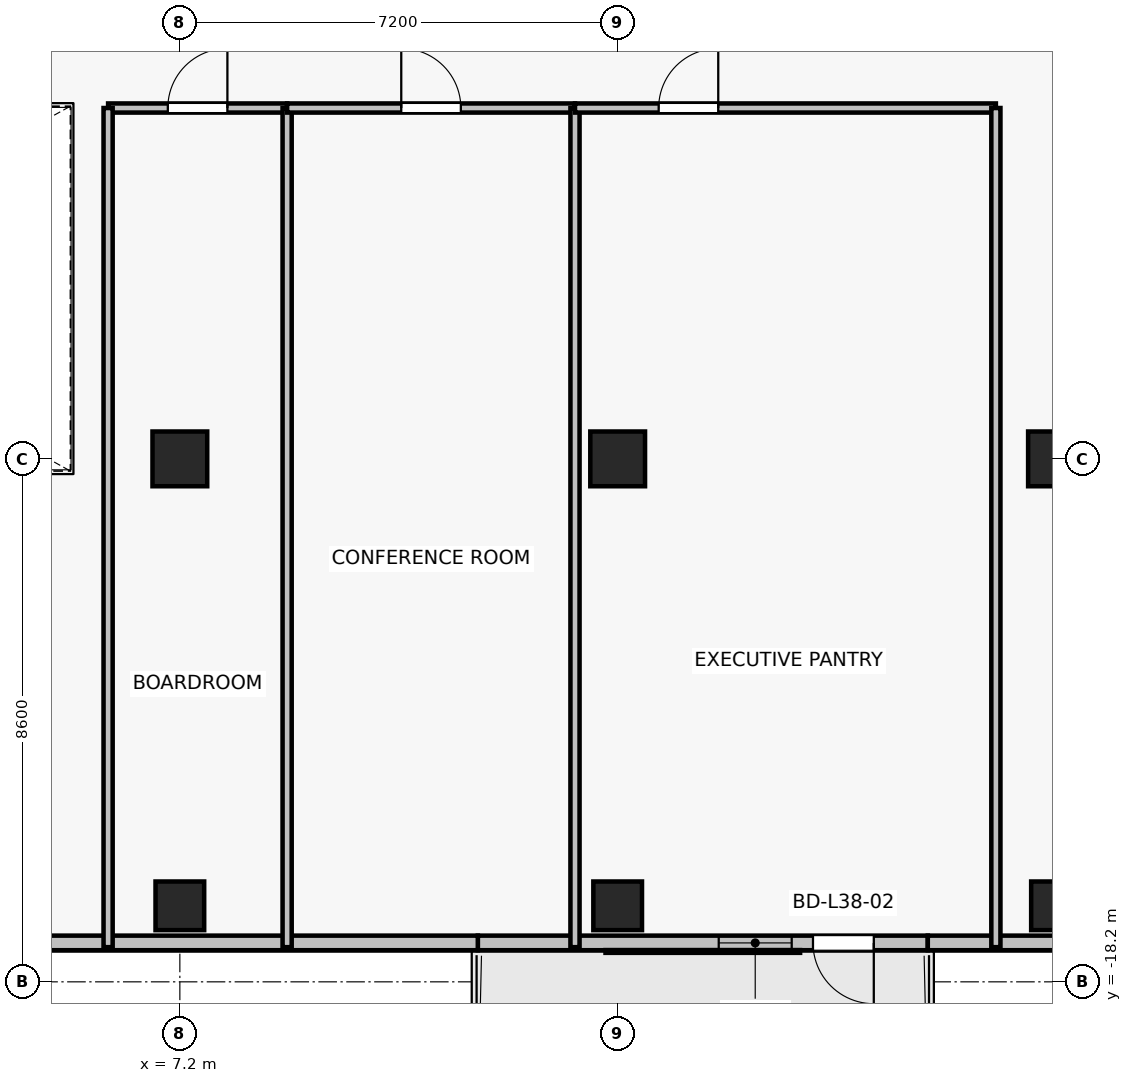
"""IFC4 building model, lengths in metres.
Left out: names, types, materials, properties, quantities, classifications, styles, units other than length and angle.
Written with IfcOpenShell. Run it as: python <this file> out.ifc"""

import sys

from ifc_helpers import new_model, si_unit, direction, frame, frame_2d, origin, origin_2d, place, context, subcontext, project, spatial, rectangle, extrude, source, transform, mapped, element, fill, save


model = new_model("IFC4")
c1 = context("Model", 3, precision=1e-05, world=origin(), true_north=direction((0.0, 1.0)))
c2 = subcontext(c1, "Body", "Model", "MODEL_VIEW")
j1 = project(units=[si_unit("LENGTHUNIT", "METRE"), si_unit("PLANEANGLEUNIT", "RADIAN")], contexts=[c1])
p1 = place(None, origin())
s1 = spatial("IfcSite", under=j1, at=p1, CompositionType="ELEMENT")
p2 = place(p1, origin())
s2 = spatial("IfcBuilding", under=s1, at=p2, CompositionType="ELEMENT")
p3 = place(p2, frame((0.0, 0.0, 136.3)))
s3 = spatial("IfcBuildingStorey", under=s2, at=p3, CompositionType="ELEMENT", Elevation=136.3)
for number, where, z_axis, x_axis in (
    (1, (7.2, -9.6, 0.0), (0.0, 0.0, 1.0), (1.0, 0.0, 0.0)),
    (2, (14.4, -9.6, 0.0), (0.0, 0.0, 1.0), (1.0, 0.0, 0.0)),
    (3, (21.6, -9.6, 0.0), (0.0, 0.0, 1.0), (1.0, 0.0, 0.0)),
):
    element("IfcColumn", number, at=place(p3, frame(where, z_axis=z_axis, x_axis=x_axis)), inside=s3, PredefinedType="COLUMN", context=c2, shape_type="SweptSolid", body=[
        extrude(rectangle(XDim=0.9, YDim=0.9, at=origin_2d()), origin(), (0.0, 0.0, 1.0), 3.3),
    ])
for number, where, z_axis, x_axis in (
    (4, (7.2, -16.95, 0.0), (0.0, 0.0, 1.0), (1.0, 0.0, 0.0)),
    (5, (14.4, -16.95, 0.0), (0.0, 0.0, 1.0), (1.0, 0.0, 0.0)),
    (6, (21.6, -16.95, 0.0), (0.0, 0.0, 1.0), (1.0, 0.0, 0.0)),
):
    element("IfcColumn", number, at=place(p3, frame(where, z_axis=z_axis, x_axis=x_axis)), inside=s3, PredefinedType="COLUMN", context=c2, shape_type="SweptSolid", body=[
        extrude(rectangle(XDim=0.8, YDim=0.8, at=origin_2d()), origin(), (0.0, 0.0, 1.0), 3.3),
    ])
p4 = place(p3, frame((19.5, -17.56, 0.0), z_axis=(0.0, 0.0, 1.0), x_axis=(-1.0, 0.0, 0.0)))
e7 = element("IfcWall", 7, at=p4, inside=s3, PredefinedType="SOLIDWALL", context=c2, shape_type="SweptSolid", body=[
    extrude(rectangle(XDim=7.4, YDim=0.24, at=frame_2d((3.7, 0.0))), origin(), (0.0, 0.0, 1.0), 3.05),
])
p5 = place(p4, frame((0.888, 0.0, 0.0)))
e8 = element("IfcOpeningElement", 8, at=p5, cuts=e7, PredefinedType="OPENING", context=c2, shape_type="SweptSolid", body=[
    extrude(rectangle(XDim=1.0, YDim=2.2, at=frame_2d((0.5, 1.1))), frame((0.0, 0.13, 0.0), z_axis=(0.0, -1.0, 0.0), x_axis=(1.0, 0.0, 0.0)), (0.0, 0.0, 1.0), 0.26),
])
p6 = place(p4, frame((2.238, 0.0, 0.85)))
e9 = element("IfcOpeningElement", 9, at=p6, cuts=e7, PredefinedType="OPENING", context=c2, shape_type="SweptSolid", body=[
    extrude(rectangle(XDim=1.2, YDim=1.5, at=frame_2d((0.6, 0.75))), frame((0.0, 0.13, 0.0), z_axis=(0.0, -1.0, 0.0), x_axis=(1.0, 0.0, 0.0)), (0.0, 0.0, 1.0), 0.26),
])
p7 = place(p3, frame((19.5, -17.56, 0.0), z_axis=(0.0, 0.0, 1.0), x_axis=(1.0, 0.0, 0.0)))
e10 = element("IfcWall", 10, at=p7, inside=s3, PredefinedType="SOLIDWALL", context=c2, shape_type="SweptSolid", body=[
    extrude(rectangle(XDim=6.96, YDim=0.24, at=frame_2d((3.48, 0.0))), origin(), (0.0, 0.0, 1.0), 3.05),
])
p8 = place(p3, frame((3.34, -17.56, 0.0), z_axis=(0.0, 0.0, 1.0), x_axis=(1.0, 0.0, 0.0)))
e11 = element("IfcWall", 11, at=p8, inside=s3, PredefinedType="SOLIDWALL", context=c2, shape_type="SweptSolid", body=[
    extrude(rectangle(XDim=8.76, YDim=0.24, at=frame_2d((4.38, 0.0))), origin(), (0.0, 0.0, 1.0), 3.05),
])
p9 = place(p3, frame((6.02, -3.83, 0.0), z_axis=(0.0, 0.0, 1.0), x_axis=(1.0, 0.0, 0.0)))
e12 = element("IfcWall", 12, at=p9, inside=s3, PredefinedType="PARTITIONING", context=c2, shape_type="SweptSolid", body=[
    extrude(rectangle(XDim=2.944, YDim=0.15, at=frame_2d((1.472, 0.0))), origin(), (0.0, 0.0, 1.0), 2.49),
])
p10 = place(p9, frame((0.982, 0.0, 0.0)))
e13 = element("IfcOpeningElement", 13, at=p10, cuts=e12, PredefinedType="OPENING", context=c2, shape_type="SweptSolid", body=[
    extrude(rectangle(XDim=0.98, YDim=2.15, at=frame_2d((0.49, 1.075))), frame((0.0, 0.085, 0.0), z_axis=(0.0, -1.0, 0.0), x_axis=(1.0, 0.0, 0.0)), (0.0, 0.0, 1.0), 0.17),
])
for number, where, z_axis, x_axis in (
    (14, (6.02, -17.63, 0.0), (0.0, 0.0, 1.0), (0.0, 1.0, 0.0)),
    (15, (8.964, -3.83, 0.0), (0.0, 0.0, 1.0), (0.0, -1.0, 0.0)),
):
    element("IfcWall", number, at=place(p3, frame(where, z_axis=z_axis, x_axis=x_axis)), inside=s3, PredefinedType="PARTITIONING", context=c2, shape_type="SweptSolid", body=[
        extrude(rectangle(XDim=13.8, YDim=0.15, at=frame_2d((6.9, 0.0))), origin(), (0.0, 0.0, 1.0), 2.49),
    ])
p11 = place(p3, frame((8.964, -3.83, 0.0), z_axis=(0.0, 0.0, 1.0), x_axis=(1.0, 0.0, 0.0)))
e16 = element("IfcWall", 16, at=p11, inside=s3, PredefinedType="PARTITIONING", context=c2, shape_type="SweptSolid", body=[
    extrude(rectangle(XDim=4.734, YDim=0.15, at=frame_2d((2.367, 0.0))), origin(), (0.0, 0.0, 1.0), 3.05),
])
p12 = place(p11, frame((1.877, 0.0, 0.0)))
e17 = element("IfcOpeningElement", 17, at=p12, cuts=e16, PredefinedType="OPENING", context=c2, shape_type="SweptSolid", body=[
    extrude(rectangle(XDim=0.98, YDim=2.15, at=frame_2d((0.49, 1.075))), frame((0.0, 0.085, 0.0), z_axis=(0.0, -1.0, 0.0), x_axis=(1.0, 0.0, 0.0)), (0.0, 0.0, 1.0), 0.17),
])
p13 = place(p3, frame((13.698, -3.83, 0.0), z_axis=(0.0, 0.0, 1.0), x_axis=(0.0, -1.0, 0.0)))
e18 = element("IfcWall", 18, at=p13, inside=s3, PredefinedType="PARTITIONING", context=c2, shape_type="SweptSolid", body=[
    extrude(rectangle(XDim=13.8, YDim=0.15, at=frame_2d((6.9, 0.0))), origin(), (0.0, 0.0, 1.0), 2.49),
])
p14 = place(p3, frame((13.698, -3.83, 0.0), z_axis=(0.0, 0.0, 1.0), x_axis=(1.0, 0.0, 0.0)))
e19 = element("IfcWall", 19, at=p14, inside=s3, PredefinedType="PARTITIONING", context=c2, shape_type="SweptSolid", body=[
    extrude(rectangle(XDim=6.922, YDim=0.15, at=frame_2d((3.461, 0.0))), origin(), (0.0, 0.0, 1.0), 2.49),
])
p15 = place(p14, frame((1.376, 0.0, 0.0)))
e20 = element("IfcOpeningElement", 20, at=p15, cuts=e19, PredefinedType="OPENING", context=c2, shape_type="SweptSolid", body=[
    extrude(rectangle(XDim=0.98, YDim=2.15, at=frame_2d((0.49, 1.075))), frame((0.0, 0.085, 0.0), z_axis=(0.0, -1.0, 0.0), x_axis=(1.0, 0.0, 0.0)), (0.0, 0.0, 1.0), 0.17),
])
p16 = place(p3, frame((20.62, -3.83, 0.0), z_axis=(0.0, 0.0, 1.0), x_axis=(0.0, -1.0, 0.0)))
e21 = element("IfcWall", 21, at=p16, inside=s3, PredefinedType="PARTITIONING", context=c2, shape_type="SweptSolid", body=[
    extrude(rectangle(XDim=13.8, YDim=0.15, at=frame_2d((6.9, 0.0))), origin(), (0.0, 0.0, 1.0), 2.49),
])
m1 = source(origin(), c2, "Body", "SweptSolid", [
    extrude(rectangle(XDim=1.0, YDim=2.2, at=frame_2d((0.5, 1.1))), frame((0.0, 0.025, 0.0), z_axis=(0.0, -1.0, 0.0), x_axis=(1.0, 0.0, 0.0)), (0.0, 0.0, 1.0), 0.05),
])
p17 = place(p5, origin())
e22 = element("IfcDoor", 22, at=p17, inside=s3, OperationType="SINGLE_SWING_LEFT", PredefinedType="DOOR", context=c2, shape_type="MappedRepresentation", body=[
    mapped(m1, transform((0.0, 0.0, 0.0), x_axis=(1.0, 0.0, 0.0), y_axis=(0.0, 1.0, 0.0), z_axis=(0.0, 0.0, 1.0), scale=1.0)),
])
fill(e8, e22)
m2 = source(origin(), c2, "Body", "SweptSolid", [
    extrude(rectangle(XDim=1.2, YDim=1.5, at=frame_2d((0.6, 0.75))), frame((0.0, 0.03, 0.0), z_axis=(0.0, -1.0, 0.0), x_axis=(1.0, 0.0, 0.0)), (0.0, 0.0, 1.0), 0.06),
])
p18 = place(p6, origin())
e23 = element("IfcWindow", 23, at=p18, inside=s3, PartitioningType="SINGLE_PANEL", PredefinedType="WINDOW", context=c2, shape_type="MappedRepresentation", body=[
    mapped(m2, transform((0.0, 0.0, 0.0), x_axis=(1.0, 0.0, 0.0), y_axis=(0.0, 1.0, 0.0), z_axis=(0.0, 0.0, 1.0), scale=1.0)),
])
fill(e9, e23)
m3 = source(origin(), c2, "Body", "SweptSolid", [
    extrude(rectangle(XDim=0.98, YDim=2.15, at=frame_2d((0.49, 1.075))), frame((0.0, 0.025, 0.0), z_axis=(0.0, -1.0, 0.0), x_axis=(1.0, 0.0, 0.0)), (0.0, 0.0, 1.0), 0.05),
])
p19 = place(p10, origin())
e24 = element("IfcDoor", 24, at=p19, inside=s3, OperationType="SINGLE_SWING_RIGHT", PredefinedType="DOOR", context=c2, shape_type="MappedRepresentation", body=[
    mapped(m3, transform((0.0, 0.0, 0.0), x_axis=(1.0, 0.0, 0.0), y_axis=(0.0, 1.0, 0.0), z_axis=(0.0, 0.0, 1.0), scale=1.0)),
])
fill(e13, e24)
p20 = place(p12, origin())
e25 = element("IfcDoor", 25, at=p20, inside=s3, OperationType="SINGLE_SWING_LEFT", PredefinedType="DOOR", context=c2, shape_type="MappedRepresentation", body=[
    mapped(m3, transform((0.0, 0.0, 0.0), x_axis=(1.0, 0.0, 0.0), y_axis=(0.0, 1.0, 0.0), z_axis=(0.0, 0.0, 1.0), scale=1.0)),
])
fill(e17, e25)
p21 = place(p15, origin())
e26 = element("IfcDoor", 26, at=p21, inside=s3, OperationType="SINGLE_SWING_RIGHT", PredefinedType="DOOR", context=c2, shape_type="MappedRepresentation", body=[
    mapped(m3, transform((0.0, 0.0, 0.0), x_axis=(1.0, 0.0, 0.0), y_axis=(0.0, 1.0, 0.0), z_axis=(0.0, 0.0, 1.0), scale=1.0)),
])
fill(e20, e26)
save(model, sys.argv[1])
